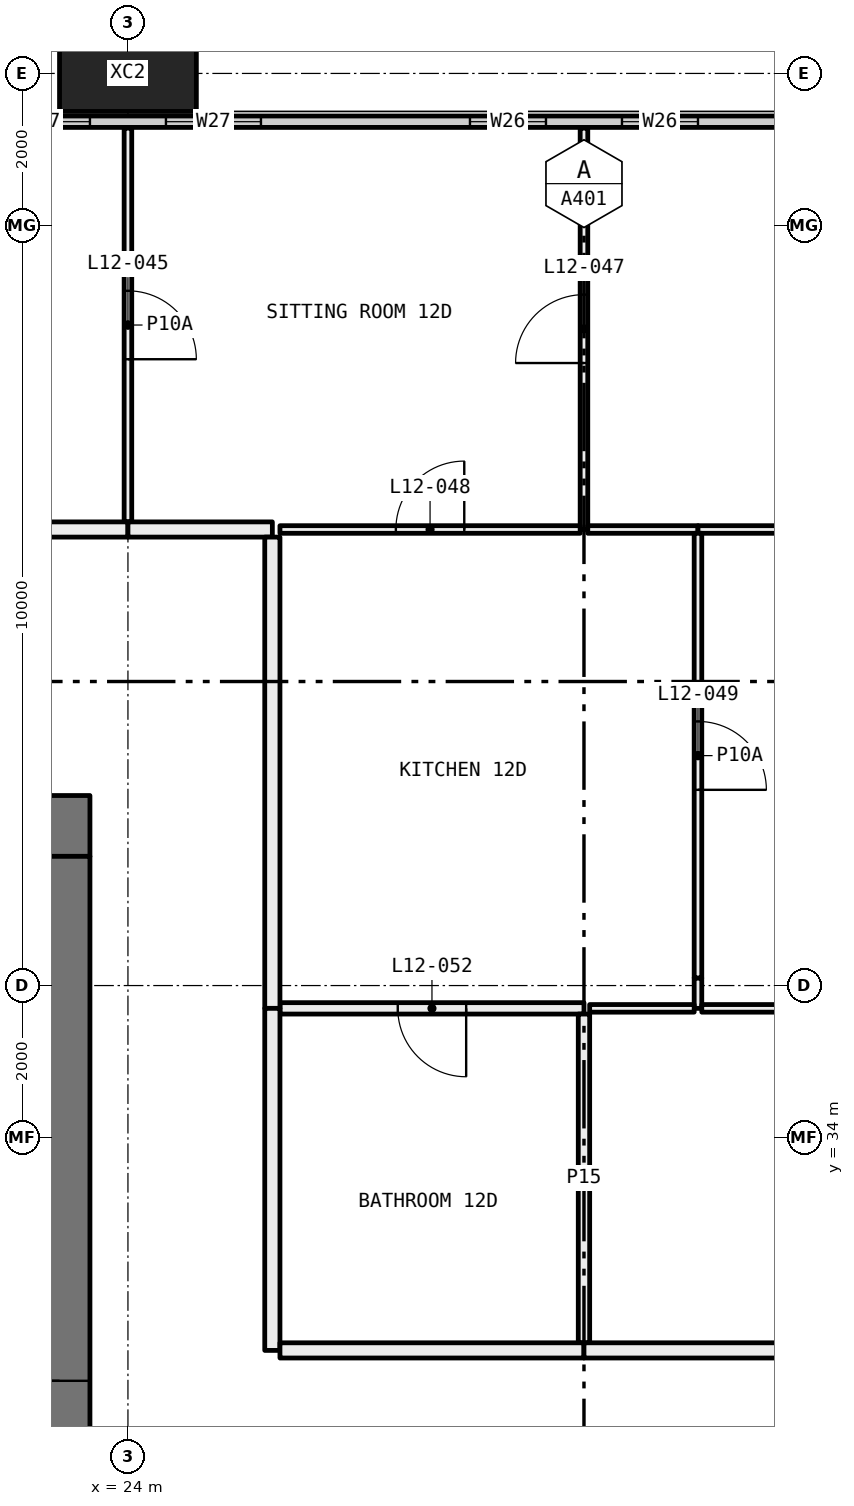
"""IFC4 building model, lengths in metres.
Left out: names, types, materials, properties, quantities, classifications, styles, units other than length and angle.
Written with IfcOpenShell. Run it as: python <this file> out.ifc"""

import sys

from ifc_helpers import new_model, si_unit, direction, frame, frame_2d, origin, origin_2d, place, context, subcontext, project, spatial, rectangle, hollow_rectangle, extrude, element, fill, save


model = new_model("IFC4")
c1 = context("Model", 3, precision=1e-05, world=origin(), true_north=direction((0.0, 1.0)))
c2 = subcontext(c1, "Body", "Model", "MODEL_VIEW")
j1 = project(units=[si_unit("LENGTHUNIT", "METRE"), si_unit("PLANEANGLEUNIT", "RADIAN")], contexts=[c1])
p1 = place(None, origin())
s1 = spatial("IfcSite", under=j1, at=p1, CompositionType="ELEMENT")
p2 = place(p1, origin())
s2 = spatial("IfcBuilding", under=s1, at=p2, CompositionType="ELEMENT")
p3 = place(p2, frame((0.0, 0.0, 54.15)))
s3 = spatial("IfcBuildingStorey", under=s2, at=p3, CompositionType="ELEMENT", Elevation=54.15)
p4 = place(p3, frame((24.0, 48.0, -0.4), z_axis=(0.0, 0.0, 1.0), x_axis=(1.0, 0.0, 0.0)))
e1 = element("IfcColumn", 1, at=p4, inside=s3, PredefinedType="COLUMN", context=c2, shape_type="SweptSolid", body=[
    extrude(hollow_rectangle(XDim=1.8, YDim=1.0, WallThickness=0.07, at=origin_2d()), origin(), (0.0, 0.0, 1.0), 3.45),
])
p5 = place(p3, frame((6.56, 47.365, 0.0), z_axis=(0.0, 0.0, 1.0), x_axis=(1.0, 0.0, 0.0)))
e2 = element("IfcWall", 2, at=p5, inside=s3, PredefinedType="ELEMENTEDWALL", context=c2, shape_type="SweptSolid", body=[
    extrude(rectangle(XDim=58.88, YDim=0.15, at=frame_2d((29.44, 0.0))), origin(), (0.0, 0.0, 1.0), 3.05),
])
p6 = place(p5, frame((0.44, 0.0, 0.45)))
e3 = element("IfcOpeningElement", 3, at=p6, cuts=e2, PredefinedType="OPENING", context=c2, shape_type="SweptSolid", body=[
    extrude(rectangle(XDim=4.5, YDim=2.55, at=frame_2d((2.25, 1.275))), frame((0.0, 0.085, 0.0), z_axis=(0.0, -1.0, 0.0), x_axis=(1.0, 0.0, 0.0)), (0.0, 0.0, 1.0), 0.17),
])
p7 = place(p5, frame((5.94, 0.0, 0.45)))
e4 = element("IfcOpeningElement", 4, at=p7, cuts=e2, PredefinedType="OPENING", context=c2, shape_type="SweptSolid", body=[
    extrude(rectangle(XDim=1.25, YDim=2.55, at=frame_2d((0.625, 1.275))), frame((0.0, 0.085, 0.0), z_axis=(0.0, -1.0, 0.0), x_axis=(1.0, 0.0, 0.0)), (0.0, 0.0, 1.0), 0.17),
])
p8 = place(p5, frame((9.94, 0.0, 0.45)))
e5 = element("IfcOpeningElement", 5, at=p8, cuts=e2, PredefinedType="OPENING", context=c2, shape_type="SweptSolid", body=[
    extrude(rectangle(XDim=1.0, YDim=2.55, at=frame_2d((0.5, 1.275))), frame((0.0, 0.085, 0.0), z_axis=(0.0, -1.0, 0.0), x_axis=(1.0, 0.0, 0.0)), (0.0, 0.0, 1.0), 0.17),
])
p9 = place(p5, frame((11.94, 0.0, 0.45)))
e6 = element("IfcOpeningElement", 6, at=p9, cuts=e2, PredefinedType="OPENING", context=c2, shape_type="SweptSolid", body=[
    extrude(rectangle(XDim=1.0, YDim=2.55, at=frame_2d((0.5, 1.275))), frame((0.0, 0.085, 0.0), z_axis=(0.0, -1.0, 0.0), x_axis=(1.0, 0.0, 0.0)), (0.0, 0.0, 1.0), 0.17),
])
p10 = place(p5, frame((15.69, 0.0, 0.45)))
e7 = element("IfcOpeningElement", 7, at=p10, cuts=e2, PredefinedType="OPENING", context=c2, shape_type="SweptSolid", body=[
    extrude(rectangle(XDim=1.25, YDim=2.55, at=frame_2d((0.625, 1.275))), frame((0.0, 0.085, 0.0), z_axis=(0.0, -1.0, 0.0), x_axis=(1.0, 0.0, 0.0)), (0.0, 0.0, 1.0), 0.17),
])
p11 = place(p5, frame((17.94, 0.0, 0.45)))
e8 = element("IfcOpeningElement", 8, at=p11, cuts=e2, PredefinedType="OPENING", context=c2, shape_type="SweptSolid", body=[
    extrude(rectangle(XDim=1.25, YDim=2.55, at=frame_2d((0.625, 1.275))), frame((0.0, 0.085, 0.0), z_axis=(0.0, -1.0, 0.0), x_axis=(1.0, 0.0, 0.0)), (0.0, 0.0, 1.0), 0.17),
])
p12 = place(p5, frame((21.94, 0.0, 0.45)))
e9 = element("IfcOpeningElement", 9, at=p12, cuts=e2, PredefinedType="OPENING", context=c2, shape_type="SweptSolid", body=[
    extrude(rectangle(XDim=1.0, YDim=2.55, at=frame_2d((0.5, 1.275))), frame((0.0, 0.085, 0.0), z_axis=(0.0, -1.0, 0.0), x_axis=(1.0, 0.0, 0.0)), (0.0, 0.0, 1.0), 0.17),
])
p13 = place(p5, frame((23.94, 0.0, 0.45)))
e10 = element("IfcOpeningElement", 10, at=p13, cuts=e2, PredefinedType="OPENING", context=c2, shape_type="SweptSolid", body=[
    extrude(rectangle(XDim=1.0, YDim=2.55, at=frame_2d((0.5, 1.275))), frame((0.0, 0.085, 0.0), z_axis=(0.0, -1.0, 0.0), x_axis=(1.0, 0.0, 0.0)), (0.0, 0.0, 1.0), 0.17),
])
p14 = place(p5, frame((27.69, 0.0, 0.45)))
e11 = element("IfcOpeningElement", 11, at=p14, cuts=e2, PredefinedType="OPENING", context=c2, shape_type="SweptSolid", body=[
    extrude(rectangle(XDim=1.25, YDim=2.55, at=frame_2d((0.625, 1.275))), frame((0.0, 0.085, 0.0), z_axis=(0.0, -1.0, 0.0), x_axis=(1.0, 0.0, 0.0)), (0.0, 0.0, 1.0), 0.17),
])
p15 = place(p5, frame((29.94, 0.0, 0.45)))
e12 = element("IfcOpeningElement", 12, at=p15, cuts=e2, PredefinedType="OPENING", context=c2, shape_type="SweptSolid", body=[
    extrude(rectangle(XDim=1.25, YDim=2.55, at=frame_2d((0.625, 1.275))), frame((0.0, 0.085, 0.0), z_axis=(0.0, -1.0, 0.0), x_axis=(1.0, 0.0, 0.0)), (0.0, 0.0, 1.0), 0.17),
])
p16 = place(p5, frame((33.94, 0.0, 0.45)))
e13 = element("IfcOpeningElement", 13, at=p16, cuts=e2, PredefinedType="OPENING", context=c2, shape_type="SweptSolid", body=[
    extrude(rectangle(XDim=1.0, YDim=2.55, at=frame_2d((0.5, 1.275))), frame((0.0, 0.085, 0.0), z_axis=(0.0, -1.0, 0.0), x_axis=(1.0, 0.0, 0.0)), (0.0, 0.0, 1.0), 0.17),
])
p17 = place(p5, frame((35.94, 0.0, 0.45)))
e14 = element("IfcOpeningElement", 14, at=p17, cuts=e2, PredefinedType="OPENING", context=c2, shape_type="SweptSolid", body=[
    extrude(rectangle(XDim=1.0, YDim=2.55, at=frame_2d((0.5, 1.275))), frame((0.0, 0.085, 0.0), z_axis=(0.0, -1.0, 0.0), x_axis=(1.0, 0.0, 0.0)), (0.0, 0.0, 1.0), 0.17),
])
p18 = place(p5, frame((39.69, 0.0, 0.45)))
e15 = element("IfcOpeningElement", 15, at=p18, cuts=e2, PredefinedType="OPENING", context=c2, shape_type="SweptSolid", body=[
    extrude(rectangle(XDim=1.25, YDim=2.55, at=frame_2d((0.625, 1.275))), frame((0.0, 0.085, 0.0), z_axis=(0.0, -1.0, 0.0), x_axis=(1.0, 0.0, 0.0)), (0.0, 0.0, 1.0), 0.17),
])
p19 = place(p5, frame((41.94, 0.0, 0.45)))
e16 = element("IfcOpeningElement", 16, at=p19, cuts=e2, PredefinedType="OPENING", context=c2, shape_type="SweptSolid", body=[
    extrude(rectangle(XDim=1.25, YDim=2.55, at=frame_2d((0.625, 1.275))), frame((0.0, 0.085, 0.0), z_axis=(0.0, -1.0, 0.0), x_axis=(1.0, 0.0, 0.0)), (0.0, 0.0, 1.0), 0.17),
])
p20 = place(p5, frame((45.94, 0.0, 0.45)))
e17 = element("IfcOpeningElement", 17, at=p20, cuts=e2, PredefinedType="OPENING", context=c2, shape_type="SweptSolid", body=[
    extrude(rectangle(XDim=1.0, YDim=2.55, at=frame_2d((0.5, 1.275))), frame((0.0, 0.085, 0.0), z_axis=(0.0, -1.0, 0.0), x_axis=(1.0, 0.0, 0.0)), (0.0, 0.0, 1.0), 0.17),
])
p21 = place(p5, frame((47.94, 0.0, 0.45)))
e18 = element("IfcOpeningElement", 18, at=p21, cuts=e2, PredefinedType="OPENING", context=c2, shape_type="SweptSolid", body=[
    extrude(rectangle(XDim=1.0, YDim=2.55, at=frame_2d((0.5, 1.275))), frame((0.0, 0.085, 0.0), z_axis=(0.0, -1.0, 0.0), x_axis=(1.0, 0.0, 0.0)), (0.0, 0.0, 1.0), 0.17),
])
p22 = place(p5, frame((51.69, 0.0, 0.45)))
e19 = element("IfcOpeningElement", 19, at=p22, cuts=e2, PredefinedType="OPENING", context=c2, shape_type="SweptSolid", body=[
    extrude(rectangle(XDim=1.25, YDim=2.55, at=frame_2d((0.625, 1.275))), frame((0.0, 0.085, 0.0), z_axis=(0.0, -1.0, 0.0), x_axis=(1.0, 0.0, 0.0)), (0.0, 0.0, 1.0), 0.17),
])
p23 = place(p5, frame((53.94, 0.0, 0.45)))
e20 = element("IfcOpeningElement", 20, at=p23, cuts=e2, PredefinedType="OPENING", context=c2, shape_type="SweptSolid", body=[
    extrude(rectangle(XDim=4.5, YDim=2.55, at=frame_2d((2.25, 1.275))), frame((0.0, 0.085, 0.0), z_axis=(0.0, -1.0, 0.0), x_axis=(1.0, 0.0, 0.0)), (0.0, 0.0, 1.0), 0.17),
])
p24 = place(p3, frame((24.0, 42.1, 0.0), z_axis=(0.0, 0.0, 1.0), x_axis=(0.0, 1.0, 0.0)))
e21 = element("IfcWall", 21, at=p24, inside=s3, PredefinedType="PARTITIONING", context=c2, shape_type="SweptSolid", body=[
    extrude(rectangle(XDim=5.18, YDim=0.1, at=frame_2d((2.59, 0.0))), origin(), (0.0, 0.0, 1.0), 3.05),
])
p25 = place(p24, frame((2.14, 0.0, 0.0)))
e22 = element("IfcOpeningElement", 22, at=p25, cuts=e21, PredefinedType="OPENING", context=c2, shape_type="SweptSolid", body=[
    extrude(rectangle(XDim=0.9, YDim=2.1, at=frame_2d((0.45, 1.05))), frame((0.0, 0.06, 0.0), z_axis=(0.0, -1.0, 0.0), x_axis=(1.0, 0.0, 0.0)), (0.0, 0.0, 1.0), 0.12),
])
p26 = place(p3, frame((18.0, 42.0, 0.0), z_axis=(0.0, 0.0, 1.0), x_axis=(1.0, 0.0, 0.0)))
e23 = element("IfcWall", 23, at=p26, inside=s3, PredefinedType="PARTITIONING", context=c2, shape_type="SweptSolid", body=[
    extrude(rectangle(XDim=6.0, YDim=0.2, at=frame_2d((3.0, 0.0))), origin(), (0.0, 0.0, 1.0), 3.05),
])
p27 = place(p26, frame((2.5, 0.0, 0.0)))
e24 = element("IfcOpeningElement", 24, at=p27, cuts=e23, PredefinedType="OPENING", context=c2, shape_type="SweptSolid", body=[
    extrude(rectangle(XDim=1.0, YDim=2.1, at=frame_2d((0.5, 1.05))), frame((0.0, 0.11, 0.0), z_axis=(0.0, -1.0, 0.0), x_axis=(1.0, 0.0, 0.0)), (0.0, 0.0, 1.0), 0.22),
])
p28 = place(p3, frame((30.0, 42.0, 0.0), z_axis=(0.0, 0.0, 1.0), x_axis=(0.0, 1.0, 0.0)))
e25 = element("IfcWall", 25, at=p28, inside=s3, PredefinedType="PARTITIONING", context=c2, shape_type="SweptSolid", body=[
    extrude(rectangle(XDim=5.28, YDim=0.1, at=frame_2d((2.64, 0.0))), origin(), (0.0, 0.0, 1.0), 3.05),
])
p29 = place(p28, frame((2.19, 0.0, 0.0)))
e26 = element("IfcOpeningElement", 26, at=p29, cuts=e25, PredefinedType="OPENING", context=c2, shape_type="SweptSolid", body=[
    extrude(rectangle(XDim=0.9, YDim=2.1, at=frame_2d((0.45, 1.05))), frame((0.0, 0.06, 0.0), z_axis=(0.0, -1.0, 0.0), x_axis=(1.0, 0.0, 0.0)), (0.0, 0.0, 1.0), 0.12),
])
p30 = place(p3, frame((26.0, 42.0, 0.0), z_axis=(0.0, 0.0, 1.0), x_axis=(1.0, 0.0, 0.0)))
e27 = element("IfcWall", 27, at=p30, inside=s3, PredefinedType="PARTITIONING", context=c2, shape_type="SweptSolid", body=[
    extrude(rectangle(XDim=3.95, YDim=0.1, at=frame_2d((1.975, 0.0))), origin(), (0.0, 0.0, 1.0), 3.05),
])
p31 = place(p30, frame((1.525, 0.0, 0.0)))
e28 = element("IfcOpeningElement", 28, at=p31, cuts=e27, PredefinedType="OPENING", context=c2, shape_type="SweptSolid", body=[
    extrude(rectangle(XDim=0.9, YDim=2.1, at=frame_2d((0.45, 1.05))), frame((0.0, 0.06, 0.0), z_axis=(0.0, -1.0, 0.0), x_axis=(1.0, 0.0, 0.0)), (0.0, 0.0, 1.0), 0.12),
])
p32 = place(p3, frame((24.0, 42.0, 0.0), z_axis=(0.0, 0.0, 1.0), x_axis=(1.0, 0.0, 0.0)))
e29 = element("IfcWall", 29, at=p32, inside=s3, PredefinedType="PARTITIONING", context=c2, shape_type="SweptSolid", body=[
    extrude(rectangle(XDim=1.9, YDim=0.2, at=frame_2d((0.95, 0.0))), origin(), (0.0, 0.0, 1.0), 3.05),
])
p33 = place(p3, frame((30.05, 42.0, 0.0), z_axis=(0.0, 0.0, 1.0), x_axis=(1.0, 0.0, 0.0)))
e30 = element("IfcWall", 30, at=p33, inside=s3, PredefinedType="PARTITIONING", context=c2, shape_type="SweptSolid", body=[
    extrude(rectangle(XDim=1.45, YDim=0.1, at=frame_2d((0.725, 0.0))), origin(), (0.0, 0.0, 1.0), 3.05),
])
p34 = place(p3, frame((31.5, 42.0, 0.0), z_axis=(0.0, 0.0, 1.0), x_axis=(1.0, 0.0, 0.0)))
e31 = element("IfcWall", 31, at=p34, inside=s3, PredefinedType="PARTITIONING", context=c2, shape_type="SweptSolid", body=[
    extrude(rectangle(XDim=4.425, YDim=0.1, at=frame_2d((2.212, 0.0))), origin(), (0.0, 0.0, 1.0), 2.45),
])
p35 = place(p3, frame((31.5, 35.7, 0.0), z_axis=(0.0, 0.0, 1.0), x_axis=(0.0, 1.0, 0.0)))
e32 = element("IfcWall", 32, at=p35, inside=s3, PredefinedType="PARTITIONING", context=c2, shape_type="SweptSolid", body=[
    extrude(rectangle(XDim=0.4, YDim=0.1, at=frame_2d((0.2, 0.0))), origin(), (0.0, 0.0, 1.0), 2.45),
])
p36 = place(p3, frame((31.5, 36.1, 0.0), z_axis=(0.0, 0.0, 1.0), x_axis=(0.0, 1.0, 0.0)))
e33 = element("IfcWall", 33, at=p36, inside=s3, PredefinedType="PARTITIONING", context=c2, shape_type="SweptSolid", body=[
    extrude(rectangle(XDim=5.85, YDim=0.1, at=frame_2d((2.925, 0.0))), origin(), (0.0, 0.0, 1.0), 3.05),
])
p37 = place(p36, frame((2.475, 0.0, 0.0)))
e34 = element("IfcOpeningElement", 34, at=p37, cuts=e33, PredefinedType="OPENING", context=c2, shape_type="SweptSolid", body=[
    extrude(rectangle(XDim=0.9, YDim=2.1, at=frame_2d((0.45, 1.05))), frame((0.0, 0.06, 0.0), z_axis=(0.0, -1.0, 0.0), x_axis=(1.0, 0.0, 0.0)), (0.0, 0.0, 1.0), 0.12),
])
p38 = place(p3, frame((26.0, 35.7, 0.0), z_axis=(0.0, 0.0, 1.0), x_axis=(1.0, 0.0, 0.0)))
e35 = element("IfcWall", 35, at=p38, inside=s3, PredefinedType="PARTITIONING", context=c2, shape_type="SweptSolid", body=[
    extrude(rectangle(XDim=4.0, YDim=0.15, at=frame_2d((2.0, 0.0))), origin(), (0.0, 0.0, 1.0), 3.05),
])
p39 = place(p38, frame((1.55, 0.0, 0.0)))
e36 = element("IfcOpeningElement", 36, at=p39, cuts=e35, PredefinedType="OPENING", context=c2, shape_type="SweptSolid", body=[
    extrude(rectangle(XDim=0.9, YDim=2.1, at=frame_2d((0.45, 1.05))), frame((0.0, 0.085, 0.0), z_axis=(0.0, -1.0, 0.0), x_axis=(1.0, 0.0, 0.0)), (0.0, 0.0, 1.0), 0.17),
])
p40 = place(p3, frame((30.075, 35.7, 0.0), z_axis=(0.0, 0.0, 1.0), x_axis=(1.0, 0.0, 0.0)))
e37 = element("IfcWall", 37, at=p40, inside=s3, PredefinedType="PARTITIONING", context=c2, shape_type="SweptSolid", body=[
    extrude(rectangle(XDim=1.375, YDim=0.1, at=frame_2d((0.688, 0.0))), origin(), (0.0, 0.0, 1.0), 3.05),
])
p41 = place(p3, frame((25.9, 41.9, 0.0), z_axis=(0.0, 0.0, 1.0), x_axis=(0.0, -1.0, 0.0)))
e38 = element("IfcWall", 38, at=p41, inside=s3, PredefinedType="PARTITIONING", context=c2, shape_type="SweptSolid", body=[
    extrude(rectangle(XDim=6.2, YDim=0.2, at=frame_2d((3.1, 0.0))), origin(), (0.0, 0.0, 1.0), 2.45),
])
p42 = place(p3, frame((31.55, 35.7, 0.0), z_axis=(0.0, 0.0, 1.0), x_axis=(1.0, 0.0, 0.0)))
e39 = element("IfcWall", 39, at=p42, inside=s3, PredefinedType="PARTITIONING", context=c2, shape_type="SweptSolid", body=[
    extrude(rectangle(XDim=3.65, YDim=0.1, at=frame_2d((1.825, 0.0))), origin(), (0.0, 0.0, 1.0), 3.05),
])
p43 = place(p42, frame((1.375, 0.0, 0.0)))
e40 = element("IfcOpeningElement", 40, at=p43, cuts=e39, PredefinedType="OPENING", context=c2, shape_type="SweptSolid", body=[
    extrude(rectangle(XDim=0.9, YDim=2.1, at=frame_2d((0.45, 1.05))), frame((0.0, 0.06, 0.0), z_axis=(0.0, -1.0, 0.0), x_axis=(1.0, 0.0, 0.0)), (0.0, 0.0, 1.0), 0.12),
])
p44 = place(p3, frame((30.0, 31.3, 0.0), z_axis=(0.0, 0.0, 1.0), x_axis=(0.0, 1.0, 0.0)))
e41 = element("IfcWall", 41, at=p44, inside=s3, PredefinedType="PARTITIONING", context=c2, shape_type="SweptSolid", body=[
    extrude(rectangle(XDim=4.325, YDim=0.15, at=frame_2d((2.163, 0.0))), origin(), (0.0, 0.0, 1.0), 3.05),
])
p45 = place(p3, frame((25.9, 35.7, 0.0), z_axis=(0.0, 0.0, 1.0), x_axis=(0.0, -1.0, 0.0)))
e42 = element("IfcWall", 42, at=p45, inside=s3, PredefinedType="PARTITIONING", context=c2, shape_type="SweptSolid", body=[
    extrude(rectangle(XDim=4.5, YDim=0.2, at=frame_2d((2.25, 0.0))), origin(), (0.0, 0.0, 1.0), 3.05),
])
p46 = place(p3, frame((26.0, 31.2, 0.0), z_axis=(0.0, 0.0, 1.0), x_axis=(1.0, 0.0, 0.0)))
e43 = element("IfcWall", 43, at=p46, inside=s3, PredefinedType="PARTITIONING", context=c2, shape_type="SweptSolid", body=[
    extrude(rectangle(XDim=4.0, YDim=0.2, at=frame_2d((2.0, 0.0))), origin(), (0.0, 0.0, 1.0), 3.05),
])
p47 = place(p3, frame((30.0, 31.2, 0.0), z_axis=(0.0, 0.0, 1.0), x_axis=(1.0, 0.0, 0.0)))
e44 = element("IfcWall", 44, at=p47, inside=s3, PredefinedType="PARTITIONING", context=c2, shape_type="SweptSolid", body=[
    extrude(rectangle(XDim=6.1, YDim=0.2, at=frame_2d((3.05, 0.0))), origin(), (0.0, 0.0, 1.0), 2.45),
])
p48 = place(p3, frame((12.5, 38.1, 0.0), z_axis=(0.0, 0.0, 1.0), x_axis=(1.0, 0.0, 0.0)))
e45 = element("IfcWall", 45, at=p48, inside=s3, PredefinedType="SHEAR", context=c2, shape_type="SweptSolid", body=[
    extrude(rectangle(XDim=11.0, YDim=0.8, at=frame_2d((5.5, 0.0))), origin(), (0.0, 0.0, 1.0), 3.05),
])
p49 = place(p48, frame((8.4, 0.0, 0.0)))
e46 = element("IfcOpeningElement", 46, at=p49, cuts=e45, PredefinedType="OPENING", context=c2, shape_type="SweptSolid", body=[
    extrude(rectangle(XDim=1.6, YDim=2.1, at=frame_2d((0.8, 1.05))), frame((0.0, 0.41, 0.0), z_axis=(0.0, -1.0, 0.0), x_axis=(1.0, 0.0, 0.0)), (0.0, 0.0, 1.0), 0.82),
])
p50 = place(p3, frame((23.1, 22.3, 0.0), z_axis=(0.0, 0.0, 1.0), x_axis=(0.0, 1.0, 0.0)))
e47 = element("IfcWall", 47, at=p50, inside=s3, PredefinedType="SHEAR", context=c2, shape_type="SweptSolid", body=[
    extrude(rectangle(XDim=15.4, YDim=0.8, at=frame_2d((7.7, 0.0))), origin(), (0.0, 0.0, 1.0), 3.05),
])
p51 = place(p50, frame((6.9, 0.0, 0.0)))
e48 = element("IfcOpeningElement", 48, at=p51, cuts=e47, PredefinedType="OPENING", context=c2, shape_type="SweptSolid", body=[
    extrude(rectangle(XDim=1.6, YDim=2.1, at=frame_2d((0.8, 1.05))), frame((0.0, 0.41, 0.0), z_axis=(0.0, -1.0, 0.0), x_axis=(1.0, 0.0, 0.0)), (0.0, 0.0, 1.0), 0.82),
])
p52 = place(p10, origin())
e49 = element("IfcWindow", 49, at=p52, inside=s3, PartitioningType="SINGLE_PANEL", PredefinedType="WINDOW", context=c2, shape_type="SweptSolid", body=[
    extrude(rectangle(XDim=1.25, YDim=2.55, at=frame_2d((0.625, 1.275))), frame((0.0, 0.03, 0.0), z_axis=(0.0, -1.0, 0.0), x_axis=(1.0, 0.0, 0.0)), (0.0, 0.0, 1.0), 0.06),
])
fill(e7, e49)
p53 = place(p11, origin())
e50 = element("IfcWindow", 50, at=p53, inside=s3, PartitioningType="SINGLE_PANEL", PredefinedType="WINDOW", context=c2, shape_type="SweptSolid", body=[
    extrude(rectangle(XDim=1.25, YDim=2.55, at=frame_2d((0.625, 1.275))), frame((0.0, 0.03, 0.0), z_axis=(0.0, -1.0, 0.0), x_axis=(1.0, 0.0, 0.0)), (0.0, 0.0, 1.0), 0.06),
])
fill(e8, e50)
p54 = place(p12, origin())
e51 = element("IfcWindow", 51, at=p54, inside=s3, PartitioningType="SINGLE_PANEL", PredefinedType="WINDOW", context=c2, shape_type="SweptSolid", body=[
    extrude(rectangle(XDim=1.0, YDim=2.55, at=frame_2d((0.5, 1.275))), frame((0.0, 0.03, 0.0), z_axis=(0.0, -1.0, 0.0), x_axis=(1.0, 0.0, 0.0)), (0.0, 0.0, 1.0), 0.06),
])
fill(e9, e51)
p55 = place(p13, origin())
e52 = element("IfcWindow", 52, at=p55, inside=s3, PartitioningType="SINGLE_PANEL", PredefinedType="WINDOW", context=c2, shape_type="SweptSolid", body=[
    extrude(rectangle(XDim=1.0, YDim=2.55, at=frame_2d((0.5, 1.275))), frame((0.0, 0.03, 0.0), z_axis=(0.0, -1.0, 0.0), x_axis=(1.0, 0.0, 0.0)), (0.0, 0.0, 1.0), 0.06),
])
fill(e10, e52)
p56 = place(p25, frame((0.9, 0.0, 0.0), x_axis=(-1.0, 0.0, 0.0)))
e53 = element("IfcDoor", 53, at=p56, inside=s3, OperationType="SINGLE_SWING_LEFT", PredefinedType="DOOR", context=c2, shape_type="SweptSolid", body=[
    extrude(rectangle(XDim=0.9, YDim=2.1, at=frame_2d((0.45, 1.05))), frame((0.0, 0.025, 0.0), z_axis=(0.0, -1.0, 0.0), x_axis=(1.0, 0.0, 0.0)), (0.0, 0.0, 1.0), 0.05),
])
fill(e22, e53)
p57 = place(p29, origin())
e54 = element("IfcDoor", 54, at=p57, inside=s3, OperationType="SINGLE_SWING_RIGHT", PredefinedType="DOOR", context=c2, shape_type="SweptSolid", body=[
    extrude(rectangle(XDim=0.9, YDim=2.1, at=frame_2d((0.45, 1.05))), frame((0.0, 0.025, 0.0), z_axis=(0.0, -1.0, 0.0), x_axis=(1.0, 0.0, 0.0)), (0.0, 0.0, 1.0), 0.05),
])
fill(e26, e54)
p58 = place(p31, origin())
e55 = element("IfcDoor", 55, at=p58, inside=s3, OperationType="SINGLE_SWING_LEFT", PredefinedType="DOOR", context=c2, shape_type="SweptSolid", body=[
    extrude(rectangle(XDim=0.9, YDim=2.1, at=frame_2d((0.45, 1.05))), frame((0.0, 0.025, 0.0), z_axis=(0.0, -1.0, 0.0), x_axis=(1.0, 0.0, 0.0)), (0.0, 0.0, 1.0), 0.05),
])
fill(e28, e55)
p59 = place(p37, frame((0.9, 0.0, 0.0), x_axis=(-1.0, 0.0, 0.0)))
e56 = element("IfcDoor", 56, at=p59, inside=s3, OperationType="SINGLE_SWING_LEFT", PredefinedType="DOOR", context=c2, shape_type="SweptSolid", body=[
    extrude(rectangle(XDim=0.9, YDim=2.1, at=frame_2d((0.45, 1.05))), frame((0.0, 0.025, 0.0), z_axis=(0.0, -1.0, 0.0), x_axis=(1.0, 0.0, 0.0)), (0.0, 0.0, 1.0), 0.05),
])
fill(e34, e56)
p60 = place(p39, frame((0.9, 0.0, 0.0), x_axis=(-1.0, 0.0, 0.0)))
e57 = element("IfcDoor", 57, at=p60, inside=s3, OperationType="SINGLE_SWING_RIGHT", PredefinedType="DOOR", context=c2, shape_type="SweptSolid", body=[
    extrude(rectangle(XDim=0.9, YDim=2.1, at=frame_2d((0.45, 1.05))), frame((0.0, 0.025, 0.0), z_axis=(0.0, -1.0, 0.0), x_axis=(1.0, 0.0, 0.0)), (0.0, 0.0, 1.0), 0.05),
])
fill(e36, e57)
p61 = place(p51, origin())
e58 = element("IfcDoor", 58, at=p61, inside=s3, OperationType="DOUBLE_DOOR_SINGLE_SWING", PredefinedType="DOOR", context=c2, shape_type="SweptSolid", body=[
    extrude(rectangle(XDim=1.6, YDim=2.1, at=frame_2d((0.8, 1.05))), frame((0.0, 0.025, 0.0), z_axis=(0.0, -1.0, 0.0), x_axis=(1.0, 0.0, 0.0)), (0.0, 0.0, 1.0), 0.05),
])
fill(e48, e58)
save(model, sys.argv[1])
